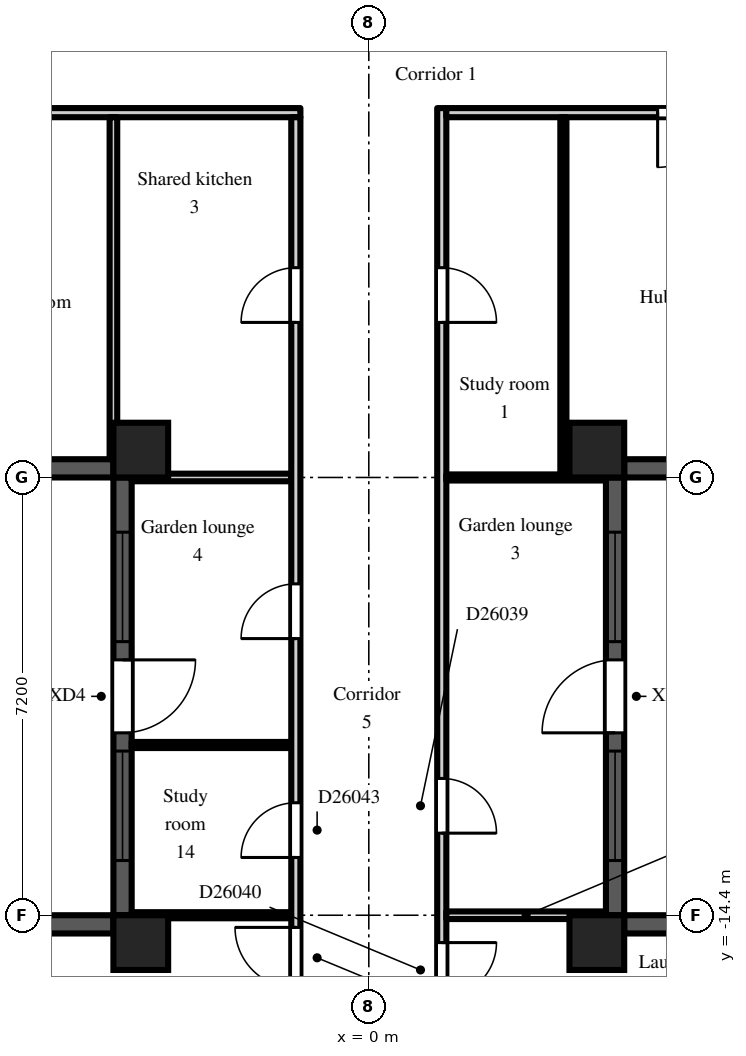
"""IFC4 building model, lengths in metres.
Left out: names, types, materials, properties, quantities, classifications, styles, units other than length and angle.
Written with IfcOpenShell. Run it as: python <this file> out.ifc"""

import sys

from ifc_helpers import new_model, si_unit, direction, frame, frame_2d, origin, origin_2d, place, context, subcontext, project, spatial, rectangle, extrude, element, fill, save


model = new_model("IFC4")
c1 = context("Model", 3, precision=1e-05, world=origin(), true_north=direction((0.0, 1.0)))
c2 = subcontext(c1, "Body", "Model", "MODEL_VIEW")
j1 = project(units=[si_unit("LENGTHUNIT", "METRE"), si_unit("PLANEANGLEUNIT", "RADIAN")], contexts=[c1])
p1 = place(None, origin())
s1 = spatial("IfcSite", under=j1, at=p1, CompositionType="ELEMENT")
p2 = place(p1, origin())
s2 = spatial("IfcBuilding", under=s1, at=p2, CompositionType="ELEMENT")
p3 = place(p2, frame((0.0, 0.0, 179.7)))
s3 = spatial("IfcBuildingStorey", under=s2, at=p3, CompositionType="ELEMENT", Elevation=179.7)
for number, where, z_axis, x_axis in (
    (1, (-3.75, -14.85, 0.0), (0.0, 0.0, 1.0), (1.0, 0.0, 0.0)),
    (2, (-3.75, -6.75, 0.0), (0.0, 0.0, 1.0), (1.0, 0.0, 0.0)),
    (3, (3.75, -14.85, 0.0), (0.0, 0.0, 1.0), (1.0, 0.0, 0.0)),
    (4, (3.75, -6.75, 0.0), (0.0, 0.0, 1.0), (1.0, 0.0, 0.0)),
):
    element("IfcColumn", number, at=place(p3, frame(where, z_axis=z_axis, x_axis=x_axis)), inside=s3, PredefinedType="COLUMN", context=c2, shape_type="SweptSolid", body=[
        extrude(rectangle(XDim=0.9, YDim=0.9, at=origin_2d()), origin(), (0.0, 0.0, 1.0), 3.0),
    ])
p4 = place(p3, frame((-7.2, -7.05, 0.0), z_axis=(0.0, 0.0, 1.0), x_axis=(1.0, 0.0, 0.0)))
e5 = element("IfcWall", 5, at=p4, inside=s3, PredefinedType="SOLIDWALL", context=c2, shape_type="SweptSolid", body=[
    extrude(rectangle(XDim=3.0, YDim=0.3, at=frame_2d((1.5, 0.0))), origin(), (0.0, 0.0, 1.0), 2.2),
])
p5 = place(p3, frame((-4.05, -7.2, 0.0), z_axis=(0.0, 0.0, 1.0), x_axis=(0.0, -1.0, 0.0)))
e6 = element("IfcWall", 6, at=p5, inside=s3, PredefinedType="SOLIDWALL", context=c2, shape_type="SweptSolid", body=[
    extrude(rectangle(XDim=7.2, YDim=0.3, at=frame_2d((3.6, 0.0))), origin(), (0.0, 0.0, 1.0), 2.2),
])
p6 = place(p5, frame((3.0, 0.0, 0.0)))
e7 = element("IfcOpeningElement", 7, at=p6, cuts=e6, PredefinedType="OPENING", context=c2, shape_type="SweptSolid", body=[
    extrude(rectangle(XDim=1.2, YDim=2.05, at=frame_2d((0.6, 1.025))), frame((0.0, 0.16, 0.0), z_axis=(0.0, -1.0, 0.0), x_axis=(1.0, 0.0, 0.0)), (0.0, 0.0, 1.0), 0.32),
])
p7 = place(p5, frame((0.9, 0.0, 0.2)))
e8 = element("IfcOpeningElement", 8, at=p7, cuts=e6, PredefinedType="OPENING", context=c2, shape_type="SweptSolid", body=[
    extrude(rectangle(XDim=1.8, YDim=1.85, at=frame_2d((0.9, 0.925))), frame((0.0, 0.16, 0.0), z_axis=(0.0, -1.0, 0.0), x_axis=(1.0, 0.0, 0.0)), (0.0, 0.0, 1.0), 0.32),
])
p8 = place(p5, frame((4.5, 0.0, 0.2)))
e9 = element("IfcOpeningElement", 9, at=p8, cuts=e6, PredefinedType="OPENING", context=c2, shape_type="SweptSolid", body=[
    extrude(rectangle(XDim=1.8, YDim=1.85, at=frame_2d((0.9, 0.925))), frame((0.0, 0.16, 0.0), z_axis=(0.0, -1.0, 0.0), x_axis=(1.0, 0.0, 0.0)), (0.0, 0.0, 1.0), 0.32),
])
for number, where, z_axis, x_axis in (
    (10, (-4.2, -14.55, 0.0), (0.0, 0.0, 1.0), (-1.0, 0.0, 0.0)),
    (11, (6.3, -14.55, 0.0), (0.0, 0.0, 1.0), (-1.0, 0.0, 0.0)),
):
    element("IfcWall", number, at=place(p3, frame(where, z_axis=z_axis, x_axis=x_axis)), inside=s3, PredefinedType="SOLIDWALL", context=c2, shape_type="SweptSolid", body=[
        extrude(rectangle(XDim=2.1, YDim=0.3, at=frame_2d((1.05, 0.0))), origin(), (0.0, 0.0, 1.0), 2.2),
    ])
p9 = place(p3, frame((4.05, -14.4, 0.0), z_axis=(0.0, 0.0, 1.0), x_axis=(0.0, 1.0, 0.0)))
e12 = element("IfcWall", 12, at=p9, inside=s3, PredefinedType="SOLIDWALL", context=c2, shape_type="SweptSolid", body=[
    extrude(rectangle(XDim=7.2, YDim=0.3, at=frame_2d((3.6, 0.0))), origin(), (0.0, 0.0, 1.0), 2.2),
])
p10 = place(p9, frame((3.0, 0.0, 0.0)))
e13 = element("IfcOpeningElement", 13, at=p10, cuts=e12, PredefinedType="OPENING", context=c2, shape_type="SweptSolid", body=[
    extrude(rectangle(XDim=1.2, YDim=2.05, at=frame_2d((0.6, 1.025))), frame((0.0, 0.16, 0.0), z_axis=(0.0, -1.0, 0.0), x_axis=(1.0, 0.0, 0.0)), (0.0, 0.0, 1.0), 0.32),
])
p11 = place(p9, frame((0.9, 0.0, 0.2)))
e14 = element("IfcOpeningElement", 14, at=p11, cuts=e12, PredefinedType="OPENING", context=c2, shape_type="SweptSolid", body=[
    extrude(rectangle(XDim=1.8, YDim=1.85, at=frame_2d((0.9, 0.925))), frame((0.0, 0.16, 0.0), z_axis=(0.0, -1.0, 0.0), x_axis=(1.0, 0.0, 0.0)), (0.0, 0.0, 1.0), 0.32),
])
p12 = place(p9, frame((4.5, 0.0, 0.2)))
e15 = element("IfcOpeningElement", 15, at=p12, cuts=e12, PredefinedType="OPENING", context=c2, shape_type="SweptSolid", body=[
    extrude(rectangle(XDim=1.8, YDim=1.85, at=frame_2d((0.9, 0.925))), frame((0.0, 0.16, 0.0), z_axis=(0.0, -1.0, 0.0), x_axis=(1.0, 0.0, 0.0)), (0.0, 0.0, 1.0), 0.32),
])
p13 = place(p3, frame((4.2, -7.05, 0.0), z_axis=(0.0, 0.0, 1.0), x_axis=(1.0, 0.0, 0.0)))
e16 = element("IfcWall", 16, at=p13, inside=s3, PredefinedType="SOLIDWALL", context=c2, shape_type="SweptSolid", body=[
    extrude(rectangle(XDim=3.0, YDim=0.3, at=frame_2d((1.5, 0.0))), origin(), (0.0, 0.0, 1.0), 2.2),
])
p14 = place(p3, frame((-7.2, -1.2, 0.0), z_axis=(0.0, 0.0, 1.0), x_axis=(1.0, 0.0, 0.0)))
e17 = element("IfcWall", 17, at=p14, inside=s3, PredefinedType="PARTITIONING", context=c2, shape_type="SweptSolid", body=[
    extrude(rectangle(XDim=6.075, YDim=0.15, at=frame_2d((3.038, 0.0))), origin(), (0.0, 0.0, 1.0), 2.6),
])
p15 = place(p14, frame((1.05, 0.0, 0.0)))
e18 = element("IfcOpeningElement", 18, at=p15, cuts=e17, PredefinedType="OPENING", context=c2, shape_type="SweptSolid", body=[
    extrude(rectangle(XDim=0.9, YDim=2.1, at=frame_2d((0.45, 1.05))), frame((0.0, 0.085, 0.0), z_axis=(0.0, -1.0, 0.0), x_axis=(1.0, 0.0, 0.0)), (0.0, 0.0, 1.0), 0.17),
])
p16 = place(p3, frame((-4.2, -6.9, 0.0), z_axis=(0.0, 0.0, 1.0), x_axis=(0.0, 1.0, 0.0)))
e19 = element("IfcWall", 19, at=p16, inside=s3, PredefinedType="PARTITIONING", context=c2, shape_type="SweptSolid", body=[
    extrude(rectangle(XDim=5.625, YDim=0.125, at=frame_2d((2.812, 0.0))), origin(), (0.0, 0.0, 1.0), 2.6),
])
for number, where, z_axis, x_axis in (
    (20, (-3.9, -14.4, 0.0), (0.0, 0.0, 1.0), (1.0, 0.0, 0.0)),
    (21, (-3.9, -11.6, 0.0), (0.0, 0.0, 1.0), (1.0, 0.0, 0.0)),
):
    element("IfcWall", number, at=place(p3, frame(where, z_axis=z_axis, x_axis=x_axis)), inside=s3, PredefinedType="PARTITIONING", context=c2, shape_type="SweptSolid", body=[
        extrude(rectangle(XDim=2.625, YDim=0.1, at=frame_2d((1.312, 0.0))), origin(), (0.0, 0.0, 1.0), 2.6),
    ])
p17 = place(p3, frame((-3.9, -7.2, 0.0), z_axis=(0.0, 0.0, 1.0), x_axis=(1.0, 0.0, 0.0)))
e22 = element("IfcWall", 22, at=p17, inside=s3, PredefinedType="PARTITIONING", context=c2, shape_type="SweptSolid", body=[
    extrude(rectangle(XDim=2.625, YDim=0.125, at=frame_2d((1.312, 0.0))), origin(), (0.0, 0.0, 1.0), 2.6),
])
p18 = place(p3, frame((-1.2, -19.525, 0.0), z_axis=(0.0, 0.0, 1.0), x_axis=(0.0, 1.0, 0.0)))
e23 = element("IfcWall", 23, at=p18, inside=s3, PredefinedType="PARTITIONING", context=c2, shape_type="SweptSolid", body=[
    extrude(rectangle(XDim=18.25, YDim=0.15, at=frame_2d((9.125, 0.0))), origin(), (0.0, 0.0, 1.0), 2.6),
])
p19 = place(p18, frame((14.875, 0.0, 0.0)))
e24 = element("IfcOpeningElement", 24, at=p19, cuts=e23, PredefinedType="OPENING", context=c2, shape_type="SweptSolid", body=[
    extrude(rectangle(XDim=0.9, YDim=2.1, at=frame_2d((0.45, 1.05))), frame((0.0, 0.085, 0.0), z_axis=(0.0, -1.0, 0.0), x_axis=(1.0, 0.0, 0.0)), (0.0, 0.0, 1.0), 0.17),
])
p20 = place(p18, frame((6.075, 0.0, 0.0)))
e25 = element("IfcOpeningElement", 25, at=p20, cuts=e23, PredefinedType="OPENING", context=c2, shape_type="SweptSolid", body=[
    extrude(rectangle(XDim=0.9, YDim=2.1, at=frame_2d((0.45, 1.05))), frame((0.0, 0.085, 0.0), z_axis=(0.0, -1.0, 0.0), x_axis=(1.0, 0.0, 0.0)), (0.0, 0.0, 1.0), 0.17),
])
p21 = place(p18, frame((9.675, 0.0, 0.0)))
e26 = element("IfcOpeningElement", 26, at=p21, cuts=e23, PredefinedType="OPENING", context=c2, shape_type="SweptSolid", body=[
    extrude(rectangle(XDim=0.9, YDim=2.1, at=frame_2d((0.45, 1.05))), frame((0.0, 0.085, 0.0), z_axis=(0.0, -1.0, 0.0), x_axis=(1.0, 0.0, 0.0)), (0.0, 0.0, 1.0), 0.17),
])
p22 = place(p18, frame((3.925, 0.0, 0.0)))
e27 = element("IfcOpeningElement", 27, at=p22, cuts=e23, PredefinedType="OPENING", context=c2, shape_type="SweptSolid", body=[
    extrude(rectangle(XDim=1.0, YDim=2.1, at=frame_2d((0.5, 1.05))), frame((0.0, 0.085, 0.0), z_axis=(0.0, -1.0, 0.0), x_axis=(1.0, 0.0, 0.0)), (0.0, 0.0, 1.0), 0.17),
])
p23 = place(p3, frame((1.2, -19.525, 0.0), z_axis=(0.0, 0.0, 1.0), x_axis=(0.0, 1.0, 0.0)))
e28 = element("IfcWall", 28, at=p23, inside=s3, PredefinedType="PARTITIONING", context=c2, shape_type="SweptSolid", body=[
    extrude(rectangle(XDim=18.4, YDim=0.15, at=frame_2d((9.2, 0.0))), origin(), (0.0, 0.0, 1.0), 2.6),
])
p24 = place(p23, frame((14.875, 0.0, 0.0)))
e29 = element("IfcOpeningElement", 29, at=p24, cuts=e28, PredefinedType="OPENING", context=c2, shape_type="SweptSolid", body=[
    extrude(rectangle(XDim=0.9, YDim=2.1, at=frame_2d((0.45, 1.05))), frame((0.0, 0.085, 0.0), z_axis=(0.0, -1.0, 0.0), x_axis=(1.0, 0.0, 0.0)), (0.0, 0.0, 1.0), 0.17),
])
p25 = place(p23, frame((6.475, 0.0, 0.0)))
e30 = element("IfcOpeningElement", 30, at=p25, cuts=e28, PredefinedType="OPENING", context=c2, shape_type="SweptSolid", body=[
    extrude(rectangle(XDim=0.9, YDim=2.1, at=frame_2d((0.45, 1.05))), frame((0.0, 0.085, 0.0), z_axis=(0.0, -1.0, 0.0), x_axis=(1.0, 0.0, 0.0)), (0.0, 0.0, 1.0), 0.17),
])
p26 = place(p23, frame((3.775, 0.0, 0.0)))
e31 = element("IfcOpeningElement", 31, at=p26, cuts=e28, PredefinedType="OPENING", context=c2, shape_type="SweptSolid", body=[
    extrude(rectangle(XDim=0.9, YDim=2.1, at=frame_2d((0.45, 1.05))), frame((0.0, 0.085, 0.0), z_axis=(0.0, -1.0, 0.0), x_axis=(1.0, 0.0, 0.0)), (0.0, 0.0, 1.0), 0.17),
])
p27 = place(p23, frame((1.975, 0.0, 0.0)))
e32 = element("IfcOpeningElement", 32, at=p27, cuts=e28, PredefinedType="OPENING", context=c2, shape_type="SweptSolid", body=[
    extrude(rectangle(XDim=0.9, YDim=2.1, at=frame_2d((0.45, 1.05))), frame((0.0, 0.085, 0.0), z_axis=(0.0, -1.0, 0.0), x_axis=(1.0, 0.0, 0.0)), (0.0, 0.0, 1.0), 0.17),
])
p28 = place(p23, frame((0.275, 0.0, 0.0)))
e33 = element("IfcOpeningElement", 33, at=p28, cuts=e28, PredefinedType="OPENING", context=c2, shape_type="SweptSolid", body=[
    extrude(rectangle(XDim=0.9, YDim=2.1, at=frame_2d((0.45, 1.05))), frame((0.0, 0.085, 0.0), z_axis=(0.0, -1.0, 0.0), x_axis=(1.0, 0.0, 0.0)), (0.0, 0.0, 1.0), 0.17),
])
p29 = place(p3, frame((1.275, -14.4, 0.0), z_axis=(0.0, 0.0, 1.0), x_axis=(1.0, 0.0, 0.0)))
e34 = element("IfcWall", 34, at=p29, inside=s3, PredefinedType="PARTITIONING", context=c2, shape_type="SweptSolid", body=[
    extrude(rectangle(XDim=2.625, YDim=0.125, at=frame_2d((1.312, 0.0))), origin(), (0.0, 0.0, 1.0), 2.6),
])
p30 = place(p3, frame((1.275, -7.2, 0.0), z_axis=(0.0, 0.0, 1.0), x_axis=(1.0, 0.0, 0.0)))
e35 = element("IfcWall", 35, at=p30, inside=s3, PredefinedType="PARTITIONING", context=c2, shape_type="SweptSolid", body=[
    extrude(rectangle(XDim=2.625, YDim=0.1, at=frame_2d((1.312, 0.0))), origin(), (0.0, 0.0, 1.0), 2.6),
])
p31 = place(p3, frame((1.275, -1.2, 0.0), z_axis=(0.0, 0.0, 1.0), x_axis=(1.0, 0.0, 0.0)))
e36 = element("IfcWall", 36, at=p31, inside=s3, PredefinedType="PARTITIONING", context=c2, shape_type="SweptSolid", body=[
    extrude(rectangle(XDim=5.925, YDim=0.15, at=frame_2d((2.962, 0.0))), origin(), (0.0, 0.0, 1.0), 2.6),
])
p32 = place(p31, frame((3.475, 0.0, 0.0)))
e37 = element("IfcOpeningElement", 37, at=p32, cuts=e36, PredefinedType="OPENING", context=c2, shape_type="SweptSolid", body=[
    extrude(rectangle(XDim=0.9, YDim=2.1, at=frame_2d((0.45, 1.05))), frame((0.0, 0.085, 0.0), z_axis=(0.0, -1.0, 0.0), x_axis=(1.0, 0.0, 0.0)), (0.0, 0.0, 1.0), 0.17),
])
p33 = place(p3, frame((3.2, -7.15, 0.0), z_axis=(0.0, 0.0, 1.0), x_axis=(0.0, 1.0, 0.0)))
e38 = element("IfcWall", 38, at=p33, inside=s3, PredefinedType="PARTITIONING", context=c2, shape_type="SweptSolid", body=[
    extrude(rectangle(XDim=5.875, YDim=0.1, at=frame_2d((2.938, 0.0))), origin(), (0.0, 0.0, 1.0), 2.6),
])
p34 = place(p6, origin())
e39 = element("IfcDoor", 39, at=p34, inside=s3, OperationType="SINGLE_SWING_LEFT", PredefinedType="DOOR", context=c2, shape_type="SweptSolid", body=[
    extrude(rectangle(XDim=1.2, YDim=2.05, at=frame_2d((0.6, 1.025))), frame((0.0, 0.025, 0.0), z_axis=(0.0, -1.0, 0.0), x_axis=(1.0, 0.0, 0.0)), (0.0, 0.0, 1.0), 0.05),
])
fill(e7, e39)
p35 = place(p7, origin())
e40 = element("IfcWindow", 40, at=p35, inside=s3, PartitioningType="SINGLE_PANEL", PredefinedType="WINDOW", context=c2, shape_type="SweptSolid", body=[
    extrude(rectangle(XDim=1.8, YDim=1.85, at=frame_2d((0.9, 0.925))), frame((0.0, 0.03, 0.0), z_axis=(0.0, -1.0, 0.0), x_axis=(1.0, 0.0, 0.0)), (0.0, 0.0, 1.0), 0.06),
])
fill(e8, e40)
p36 = place(p8, origin())
e41 = element("IfcWindow", 41, at=p36, inside=s3, PartitioningType="SINGLE_PANEL", PredefinedType="WINDOW", context=c2, shape_type="SweptSolid", body=[
    extrude(rectangle(XDim=1.8, YDim=1.85, at=frame_2d((0.9, 0.925))), frame((0.0, 0.03, 0.0), z_axis=(0.0, -1.0, 0.0), x_axis=(1.0, 0.0, 0.0)), (0.0, 0.0, 1.0), 0.06),
])
fill(e9, e41)
p37 = place(p10, origin())
e42 = element("IfcDoor", 42, at=p37, inside=s3, OperationType="SINGLE_SWING_LEFT", PredefinedType="DOOR", context=c2, shape_type="SweptSolid", body=[
    extrude(rectangle(XDim=1.2, YDim=2.05, at=frame_2d((0.6, 1.025))), frame((0.0, 0.025, 0.0), z_axis=(0.0, -1.0, 0.0), x_axis=(1.0, 0.0, 0.0)), (0.0, 0.0, 1.0), 0.05),
])
fill(e13, e42)
p38 = place(p11, origin())
e43 = element("IfcWindow", 43, at=p38, inside=s3, PartitioningType="SINGLE_PANEL", PredefinedType="WINDOW", context=c2, shape_type="SweptSolid", body=[
    extrude(rectangle(XDim=1.8, YDim=1.85, at=frame_2d((0.9, 0.925))), frame((0.0, 0.03, 0.0), z_axis=(0.0, -1.0, 0.0), x_axis=(1.0, 0.0, 0.0)), (0.0, 0.0, 1.0), 0.06),
])
fill(e14, e43)
p39 = place(p12, origin())
e44 = element("IfcWindow", 44, at=p39, inside=s3, PartitioningType="SINGLE_PANEL", PredefinedType="WINDOW", context=c2, shape_type="SweptSolid", body=[
    extrude(rectangle(XDim=1.8, YDim=1.85, at=frame_2d((0.9, 0.925))), frame((0.0, 0.03, 0.0), z_axis=(0.0, -1.0, 0.0), x_axis=(1.0, 0.0, 0.0)), (0.0, 0.0, 1.0), 0.06),
])
fill(e15, e44)
p40 = place(p24, frame((0.9, 0.0, 0.0), z_axis=(0.0, 0.0, 1.0), x_axis=(-1.0, 0.0, 0.0)))
e45 = element("IfcDoor", 45, at=p40, inside=s3, OperationType="SINGLE_SWING_RIGHT", PredefinedType="DOOR", context=c2, shape_type="SweptSolid", body=[
    extrude(rectangle(XDim=0.9, YDim=2.1, at=frame_2d((0.45, 1.05))), frame((0.0, 0.025, 0.0), z_axis=(0.0, -1.0, 0.0), x_axis=(1.0, 0.0, 0.0)), (0.0, 0.0, 1.0), 0.05),
])
fill(e29, e45)
p41 = place(p32, frame((0.9, 0.0, 0.0), z_axis=(0.0, 0.0, 1.0), x_axis=(-1.0, 0.0, 0.0)))
e46 = element("IfcDoor", 46, at=p41, inside=s3, OperationType="SINGLE_SWING_RIGHT", PredefinedType="DOOR", context=c2, shape_type="SweptSolid", body=[
    extrude(rectangle(XDim=0.9, YDim=2.1, at=frame_2d((0.45, 1.05))), frame((0.0, 0.025, 0.0), z_axis=(0.0, -1.0, 0.0), x_axis=(1.0, 0.0, 0.0)), (0.0, 0.0, 1.0), 0.05),
])
fill(e37, e46)
p42 = place(p19, origin())
e47 = element("IfcDoor", 47, at=p42, inside=s3, OperationType="SINGLE_SWING_LEFT", PredefinedType="DOOR", context=c2, shape_type="SweptSolid", body=[
    extrude(rectangle(XDim=0.9, YDim=2.1, at=frame_2d((0.45, 1.05))), frame((0.0, 0.025, 0.0), z_axis=(0.0, -1.0, 0.0), x_axis=(1.0, 0.0, 0.0)), (0.0, 0.0, 1.0), 0.05),
])
fill(e24, e47)
p43 = place(p25, frame((0.9, 0.0, 0.0), z_axis=(0.0, 0.0, 1.0), x_axis=(-1.0, 0.0, 0.0)))
e48 = element("IfcDoor", 48, at=p43, inside=s3, OperationType="SINGLE_SWING_RIGHT", PredefinedType="DOOR", context=c2, shape_type="SweptSolid", body=[
    extrude(rectangle(XDim=0.9, YDim=2.1, at=frame_2d((0.45, 1.05))), frame((0.0, 0.025, 0.0), z_axis=(0.0, -1.0, 0.0), x_axis=(1.0, 0.0, 0.0)), (0.0, 0.0, 1.0), 0.05),
])
fill(e30, e48)
p44 = place(p26, frame((0.9, 0.0, 0.0), z_axis=(0.0, 0.0, 1.0), x_axis=(-1.0, 0.0, 0.0)))
e49 = element("IfcDoor", 49, at=p44, inside=s3, OperationType="SINGLE_SWING_LEFT", PredefinedType="DOOR", context=c2, shape_type="SweptSolid", body=[
    extrude(rectangle(XDim=0.9, YDim=2.1, at=frame_2d((0.45, 1.05))), frame((0.0, 0.025, 0.0), z_axis=(0.0, -1.0, 0.0), x_axis=(1.0, 0.0, 0.0)), (0.0, 0.0, 1.0), 0.05),
])
fill(e31, e49)
p45 = place(p20, origin())
e50 = element("IfcDoor", 50, at=p45, inside=s3, OperationType="SINGLE_SWING_LEFT", PredefinedType="DOOR", context=c2, shape_type="SweptSolid", body=[
    extrude(rectangle(XDim=0.9, YDim=2.1, at=frame_2d((0.45, 1.05))), frame((0.0, 0.025, 0.0), z_axis=(0.0, -1.0, 0.0), x_axis=(1.0, 0.0, 0.0)), (0.0, 0.0, 1.0), 0.05),
])
fill(e25, e50)
p46 = place(p21, origin())
e51 = element("IfcDoor", 51, at=p46, inside=s3, OperationType="SINGLE_SWING_LEFT", PredefinedType="DOOR", context=c2, shape_type="SweptSolid", body=[
    extrude(rectangle(XDim=0.9, YDim=2.1, at=frame_2d((0.45, 1.05))), frame((0.0, 0.025, 0.0), z_axis=(0.0, -1.0, 0.0), x_axis=(1.0, 0.0, 0.0)), (0.0, 0.0, 1.0), 0.05),
])
fill(e26, e51)
p47 = place(p22, origin())
e52 = element("IfcDoor", 52, at=p47, inside=s3, OperationType="SINGLE_SWING_RIGHT", PredefinedType="DOOR", context=c2, shape_type="SweptSolid", body=[
    extrude(rectangle(XDim=1.0, YDim=2.1, at=frame_2d((0.5, 1.05))), frame((0.0, 0.025, 0.0), z_axis=(0.0, -1.0, 0.0), x_axis=(1.0, 0.0, 0.0)), (0.0, 0.0, 1.0), 0.05),
])
fill(e27, e52)
save(model, sys.argv[1])
